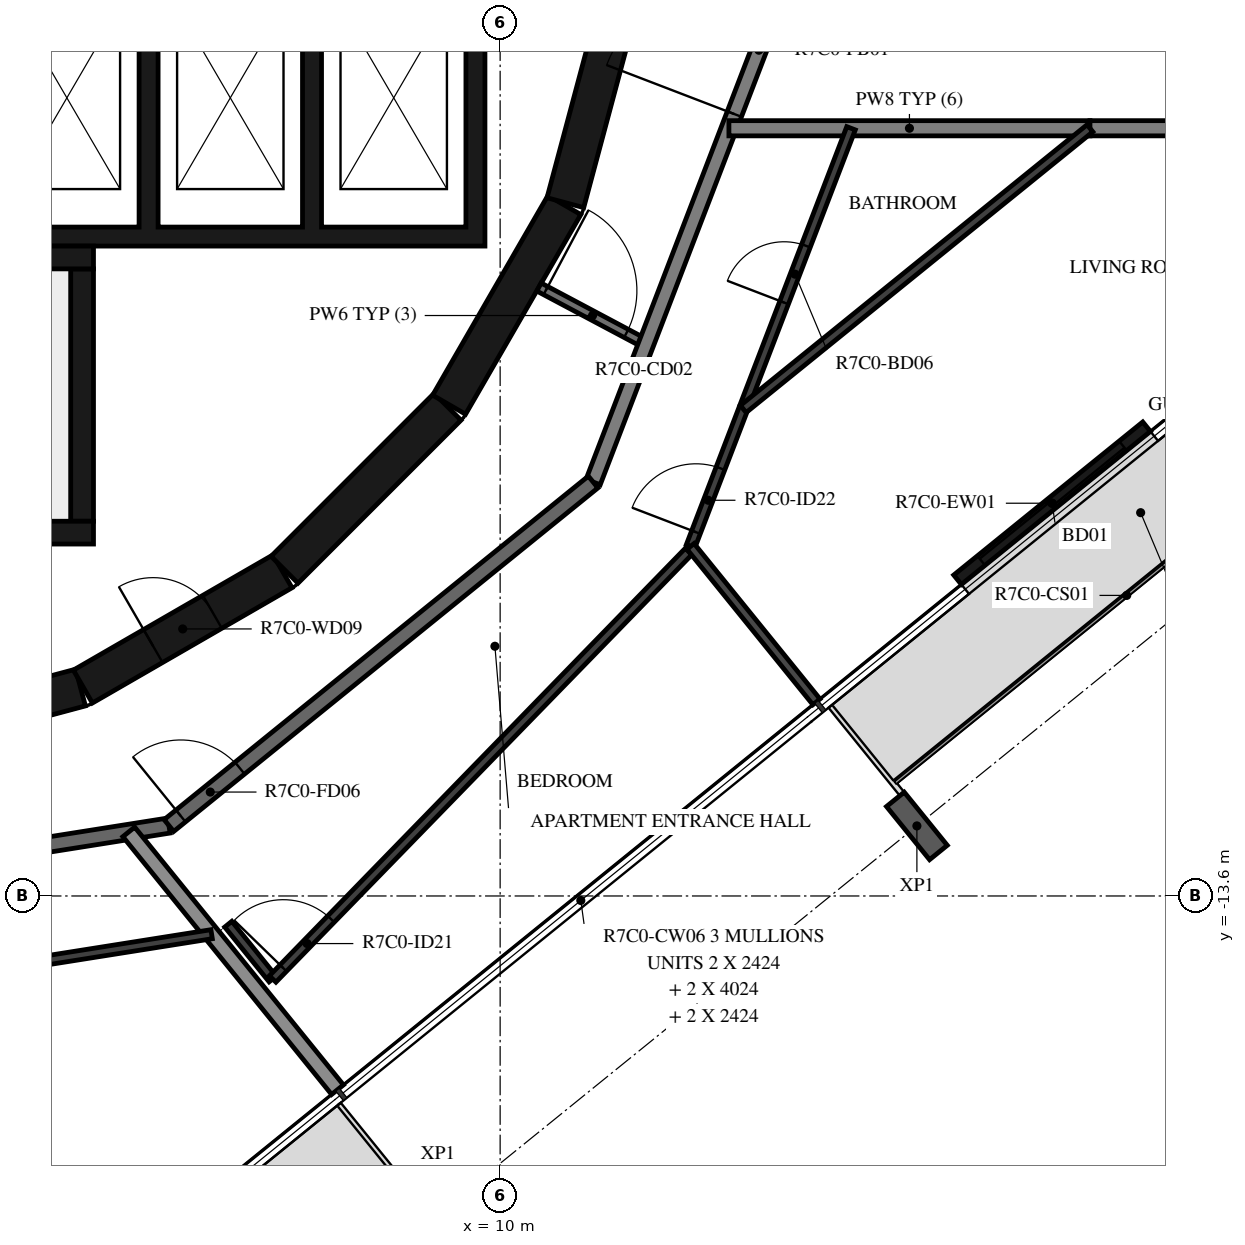
"""IFC4 building model, lengths in metres.
Left out: names, types, materials, properties, quantities, classifications, styles, units other than length and angle.
Written with IfcOpenShell. Run it as: python <this file> out.ifc"""

import sys

from ifc_helpers import new_model, si_unit, direction, frame, frame_2d, origin, origin_2d, place, context, subcontext, project, spatial, polyline, rectangle, i_section, outline, extrude, element, fill, save


model = new_model("IFC4")
c1 = context("Model", 3, precision=1e-05, world=origin(), true_north=direction((0.0, 1.0)))
c2 = subcontext(c1, "Body", "Model", "MODEL_VIEW")
j1 = project(units=[si_unit("LENGTHUNIT", "METRE"), si_unit("PLANEANGLEUNIT", "RADIAN")], contexts=[c1])
p1 = place(None, origin())
s1 = spatial("IfcSite", under=j1, at=p1, CompositionType="ELEMENT")
p2 = place(p1, origin())
s2 = spatial("IfcBuilding", under=s1, at=p2, CompositionType="ELEMENT")
p3 = place(p2, frame((0.0, 0.0, 284.4)))
s3 = spatial("IfcBuildingStorey", under=s2, at=p3, CompositionType="ELEMENT", Elevation=284.4)
p4 = place(p3, frame((15.483, -12.678, -0.38), z_axis=(0.0, 0.0, 1.0), x_axis=(-0.777146167973, -0.629320136024, 0.0)))
e1 = element("IfcColumn", 1, at=p4, inside=s3, PredefinedType="COLUMN", context=c2, shape_type="SweptSolid", body=[
    extrude(i_section(OverallWidth=0.3, OverallDepth=0.9, WebThickness=0.019, FlangeThickness=0.035, FilletRadius=0.03, at=origin_2d()), origin(), (0.0, 0.0, 1.0), 3.5),
])
p5 = place(p3, frame((16.018, -9.44, 0.0), z_axis=(0.0, 0.0, 1.0), x_axis=(0.777125818, 0.629345265333, 0.0)))
e2 = element("IfcWall", 2, at=p5, inside=s3, PredefinedType="STANDARD", context=c2, shape_type="SweptSolid", body=[
    extrude(rectangle(XDim=3.2, YDim=0.16, at=frame_2d((1.6, 0.0))), origin(), (0.0, 0.0, 1.0), 3.12),
])
p6 = place(p5, frame((0.4, 0.0, 0.0)))
e3 = element("IfcOpeningElement", 3, at=p6, cuts=e2, PredefinedType="OPENING", context=c2, shape_type="SweptSolid", body=[
    extrude(rectangle(XDim=2.4, YDim=2.4, at=frame_2d((1.2, 1.2))), frame((0.0, 0.09, 0.0), z_axis=(0.0, -1.0, 0.0), x_axis=(1.0, 0.0, 0.0)), (0.0, 0.0, 1.0), 0.18),
])
p7 = place(p3, frame((1.55, -11.643, 0.0), z_axis=(0.0, 0.0, 1.0), x_axis=(0.965948410781, 0.258734743916, 0.0)))
e4 = element("IfcWall", 4, at=p7, inside=s3, PredefinedType="SHEAR", context=c2, shape_type="SweptSolid", body=[
    extrude(rectangle(XDim=3.033, YDim=0.5, at=frame_2d((1.516, 0.0))), origin(), (0.0, 0.0, 1.0), 3.12),
])
p8 = place(p3, frame((4.51, -10.845, 0.0), z_axis=(0.0, 0.0, 1.0), x_axis=(0.865975092491, 0.500087131594, 0.0)))
e5 = element("IfcWall", 5, at=p8, inside=s3, PredefinedType="SHEAR", context=c2, shape_type="SweptSolid", body=[
    extrude(rectangle(XDim=3.033, YDim=0.5, at=frame_2d((1.516, 0.0))), origin(), (0.0, 0.0, 1.0), 3.12),
])
p9 = place(p8, frame((1.066, 0.0, 0.0)))
e6 = element("IfcOpeningElement", 6, at=p9, cuts=e5, PredefinedType="OPENING", context=c2, shape_type="SweptSolid", body=[
    extrude(rectangle(XDim=0.9, YDim=2.1, at=frame_2d((0.45, 1.05))), frame((0.0, 0.26, 0.0), z_axis=(0.0, -1.0, 0.0), x_axis=(1.0, 0.0, 0.0)), (0.0, 0.0, 1.0), 0.52),
])
p10 = place(p3, frame((7.164, -9.308, 0.0), z_axis=(0.0, 0.0, 1.0), x_axis=(0.707106781187, 0.707106781187, 0.0)))
e7 = element("IfcWall", 7, at=p10, inside=s3, PredefinedType="SHEAR", context=c2, shape_type="SweptSolid", body=[
    extrude(rectangle(XDim=3.032, YDim=0.5, at=frame_2d((1.516, 0.0))), origin(), (0.0, 0.0, 1.0), 3.12),
])
for number, where, z_axis, x_axis in (
    (8, (9.329, -7.137, 0.0), (0.0, 0.0, 1.0), (0.5, 0.866, 0.0)),
    (9, (10.858, -4.479, 0.0), (0.0, 0.0, 1.0), (0.259, 0.966, 0.0)),
):
    element("IfcWall", number, at=place(p3, frame(where, z_axis=z_axis, x_axis=x_axis)), inside=s3, PredefinedType="SHEAR", context=c2, shape_type="SweptSolid", body=[
        extrude(rectangle(XDim=3.033, YDim=0.5, at=frame_2d((1.516, 0.0))), origin(), (0.0, 0.0, 1.0), 3.12),
    ])
p11 = place(p3, frame((-2.4, -5.2, 0.0), z_axis=(0.0, 0.0, 1.0), x_axis=(1.0, 0.0, 0.0)))
e10 = element("IfcWall", 10, at=p11, inside=s3, PredefinedType="SHEAR", context=c2, shape_type="SweptSolid", body=[
    extrude(rectangle(XDim=7.05, YDim=0.3, at=frame_2d((3.525, 0.0))), origin(), (0.0, 0.0, 1.0), 3.12),
])
p12 = place(p3, frame((4.5, -8.67, 0.0), z_axis=(0.0, 0.0, 1.0), x_axis=(0.0, 1.0, 0.0)))
e11 = element("IfcWall", 11, at=p12, inside=s3, PredefinedType="SHEAR", context=c2, shape_type="SweptSolid", body=[
    extrude(rectangle(XDim=3.32, YDim=0.3, at=frame_2d((1.66, 0.0))), origin(), (0.0, 0.0, 1.0), 3.12),
])
p13 = place(p3, frame((0.1, -8.82, 0.0), z_axis=(0.0, 0.0, 1.0), x_axis=(1.0, 0.0, 0.0)))
e12 = element("IfcWall", 12, at=p13, inside=s3, PredefinedType="SHEAR", context=c2, shape_type="SweptSolid", body=[
    extrude(rectangle(XDim=4.55, YDim=0.3, at=frame_2d((2.275, 0.0))), origin(), (0.0, 0.0, 1.0), 3.12),
])
p14 = place(p3, origin())
e13 = element("IfcWall", 13, at=p14, inside=s3, PredefinedType="SHEAR", context=c2, shape_type="SweptSolid", body=[
    extrude(outline(polyline([(9.8, -5.05), (9.8, -4.8), (9.8, -1.9), (9.55, -1.9), (9.55, -4.8), (7.65, -4.8), (7.65, -1.9), (7.4, -1.9), (7.4, -4.8), (5.5, -4.8), (5.5, -1.9), (5.25, -1.9), (5.25, -4.8), (3.35, -4.8), (3.35, -1.9), (3.1, -1.9), (3.1, -4.8), (1.2, -4.8), (1.2, -1.9), (0.95, -1.9), (0.95, -4.8), (-0.95, -4.8), (-0.95, -1.9), (-1.2, -1.9), (-1.2, -4.8), (-3.1, -4.8), (-3.1, -1.9), (-3.35, -1.9), (-3.35, -4.8), (-5.25, -4.8), (-5.25, -1.9), (-5.5, -1.9), (-5.5, -4.8), (-9.55, -4.8), (-9.55, -1.9), (-9.8, -1.9), (-9.8, -4.8), (-9.8, -5.05), (9.8, -5.05)])), origin(), (0.0, 0.0, 1.0), 3.12),
])
p15 = place(p3, frame((10.511, -5.589, 0.0), z_axis=(0.0, 0.0, 1.0), x_axis=(0.882983002821, -0.469404960273, 0.0)))
e14 = element("IfcWall", 14, at=p15, inside=s3, PredefinedType="PARTITIONING", context=c2, shape_type="SweptSolid", body=[
    extrude(rectangle(XDim=1.596, YDim=0.12, at=frame_2d((0.798, 0.0))), origin(), (0.0, 0.0, 1.0), 3.12),
])
p16 = place(p15, frame((0.1, 0.0, 0.0)))
e15 = element("IfcOpeningElement", 15, at=p16, cuts=e14, PredefinedType="OPENING", context=c2, shape_type="SweptSolid", body=[
    extrude(rectangle(XDim=1.2, YDim=2.1, at=frame_2d((0.6, 1.05))), frame((0.0, 0.07, 0.0), z_axis=(0.0, -1.0, 0.0), x_axis=(1.0, 0.0, 0.0)), (0.0, 0.0, 1.0), 0.14),
])
p17 = place(p3, frame((11.223, -8.154, 0.0), z_axis=(0.0, 0.0, 1.0), x_axis=(0.358341090983, 0.93359073609, 0.0)))
e16 = element("IfcWall", 16, at=p17, inside=s3, PredefinedType="STANDARD", context=c2, shape_type="SweptSolid", body=[
    extrude(rectangle(XDim=7.181, YDim=0.2, at=frame_2d((3.59, 0.0))), origin(), (0.0, 0.0, 1.0), 3.12),
])
p18 = place(p17, frame((5.185, 0.0, 0.0)))
e17 = element("IfcOpeningElement", 17, at=p18, cuts=e16, PredefinedType="OPENING", context=c2, shape_type="SweptSolid", body=[
    extrude(rectangle(XDim=1.8, YDim=2.1, at=frame_2d((0.9, 1.05))), frame((0.0, 0.11, 0.0), z_axis=(0.0, -1.0, 0.0), x_axis=(1.0, 0.0, 0.0)), (0.0, 0.0, 1.0), 0.22),
])
p19 = place(p3, frame((-1.45, -13.797, 0.0), z_axis=(0.0, 0.0, 1.0), x_axis=(0.987690361611, 0.156421704315, 0.0)))
e18 = element("IfcWall", 18, at=p19, inside=s3, PredefinedType="STANDARD", context=c2, shape_type="SweptSolid", body=[
    extrude(rectangle(XDim=7.181, YDim=0.2, at=frame_2d((3.591, 0.0))), origin(), (0.0, 0.0, 1.0), 3.12),
])
p20 = place(p19, frame((0.2, 0.0, 0.0)))
e19 = element("IfcOpeningElement", 19, at=p20, cuts=e18, PredefinedType="OPENING", context=c2, shape_type="SweptSolid", body=[
    extrude(rectangle(XDim=1.0, YDim=2.1, at=frame_2d((0.5, 1.05))), frame((0.0, 0.11, 0.0), z_axis=(0.0, -1.0, 0.0), x_axis=(1.0, 0.0, 0.0)), (0.0, 0.0, 1.0), 0.22),
])
p21 = place(p3, frame((5.643, -12.673, 0.0), z_axis=(0.0, 0.0, 1.0), x_axis=(0.777160148113, 0.629302871585, 0.0)))
e20 = element("IfcWall", 20, at=p21, inside=s3, PredefinedType="STANDARD", context=c2, shape_type="SweptSolid", body=[
    extrude(rectangle(XDim=7.181, YDim=0.2, at=frame_2d((3.59, 0.0))), origin(), (0.0, 0.0, 1.0), 3.12),
])
p22 = place(p21, frame((0.2, 0.0, 0.0)))
e21 = element("IfcOpeningElement", 21, at=p22, cuts=e20, PredefinedType="OPENING", context=c2, shape_type="SweptSolid", body=[
    extrude(rectangle(XDim=1.0, YDim=2.1, at=frame_2d((0.5, 1.05))), frame((0.0, 0.11, 0.0), z_axis=(0.0, -1.0, 0.0), x_axis=(1.0, 0.0, 0.0)), (0.0, 0.0, 1.0), 0.22),
])
p23 = place(p3, frame((13.01, -3.5, 0.0), z_axis=(0.0, 0.0, 1.0), x_axis=(1.0, 0.0, 0.0)))
e22 = element("IfcWall", 22, at=p23, inside=s3, PredefinedType="STANDARD", context=c2, shape_type="SweptSolid", body=[
    extrude(rectangle(XDim=4.75, YDim=0.2, at=frame_2d((2.375, 0.0))), origin(), (0.0, 0.0, 1.0), 3.12),
])
p24 = place(p3, frame((17.76, -3.5, 0.0), z_axis=(0.0, 0.0, 1.0), x_axis=(1.0, 0.0, 0.0)))
e23 = element("IfcWall", 23, at=p24, inside=s3, PredefinedType="STANDARD", context=c2, shape_type="SweptSolid", body=[
    extrude(rectangle(XDim=1.64, YDim=0.2, at=frame_2d((0.82, 0.0))), origin(), (0.0, 0.0, 1.0), 3.12),
])
p25 = place(p3, frame((7.861, -16.148, 0.0), z_axis=(0.0, 0.0, 1.0), x_axis=(-0.629330189513, 0.777138026716, 0.0)))
e24 = element("IfcWall", 24, at=p25, inside=s3, PredefinedType="STANDARD", context=c2, shape_type="SweptSolid", body=[
    extrude(rectangle(XDim=4.364, YDim=0.2, at=frame_2d((2.182, 0.0))), origin(), (0.0, 0.0, 1.0), 2.73),
])
p26 = place(p3, frame((-1.612, -15.341, 0.0), z_axis=(0.0, 0.0, 1.0), x_axis=(0.987687560018, 0.15643939333, 0.0)))
e25 = element("IfcWall", 25, at=p26, inside=s3, PredefinedType="PARTITIONING", context=c2, shape_type="SweptSolid", body=[
    extrude(rectangle(XDim=7.914, YDim=0.12, at=frame_2d((3.957, 0.0))), origin(), (0.0, 0.0, 1.0), 3.12),
])
p27 = place(p26, frame((2.978, 0.0, 0.0)))
e26 = element("IfcOpeningElement", 26, at=p27, cuts=e25, PredefinedType="OPENING", context=c2, shape_type="SweptSolid", body=[
    extrude(rectangle(XDim=0.9, YDim=2.1, at=frame_2d((0.45, 1.05))), frame((0.0, 0.07, 0.0), z_axis=(0.0, -1.0, 0.0), x_axis=(1.0, 0.0, 0.0)), (0.0, 0.0, 1.0), 0.14),
])
p28 = place(p3, frame((6.424, -13.971, 0.0), z_axis=(0.0, 0.0, 1.0), x_axis=(0.629273936268, -0.777183577499, 0.0)))
e27 = element("IfcWall", 27, at=p28, inside=s3, PredefinedType="PARTITIONING", context=c2, shape_type="SweptSolid", body=[
    extrude(rectangle(XDim=0.928, YDim=0.12, at=frame_2d((0.464, 0.0))), origin(), (0.0, 0.0, 1.0), 3.12),
])
p29 = place(p3, frame((7.007, -14.692, 0.0), z_axis=(0.0, 0.0, 1.0), x_axis=(0.697286714348, 0.716792325568, 0.0)))
e28 = element("IfcWall", 28, at=p29, inside=s3, PredefinedType="PARTITIONING", context=c2, shape_type="SweptSolid", body=[
    extrude(rectangle(XDim=7.848, YDim=0.12, at=frame_2d((3.924, 0.0))), origin(), (0.0, 0.0, 1.0), 3.12),
])
p30 = place(p29, frame((0.2, 0.0, 0.0)))
e29 = element("IfcOpeningElement", 29, at=p30, cuts=e28, PredefinedType="OPENING", context=c2, shape_type="SweptSolid", body=[
    extrude(rectangle(XDim=0.9, YDim=2.1, at=frame_2d((0.45, 1.05))), frame((0.0, 0.07, 0.0), z_axis=(0.0, -1.0, 0.0), x_axis=(1.0, 0.0, 0.0)), (0.0, 0.0, 1.0), 0.14),
])
p31 = place(p3, frame((12.505, -9.001, 0.0), z_axis=(0.0, 0.0, 1.0), x_axis=(0.358373707046, 0.933578216379, 0.0)))
e30 = element("IfcWall", 30, at=p31, inside=s3, PredefinedType="PARTITIONING", context=c2, shape_type="SweptSolid", body=[
    extrude(rectangle(XDim=5.892, YDim=0.12, at=frame_2d((2.946, 0.0))), origin(), (0.0, 0.0, 1.0), 3.12),
])
p32 = place(p31, frame((0.2, 0.0, 0.0)))
e31 = element("IfcOpeningElement", 31, at=p32, cuts=e30, PredefinedType="OPENING", context=c2, shape_type="SweptSolid", body=[
    extrude(rectangle(XDim=0.9, YDim=2.1, at=frame_2d((0.45, 1.05))), frame((0.0, 0.07, 0.0), z_axis=(0.0, -1.0, 0.0), x_axis=(1.0, 0.0, 0.0)), (0.0, 0.0, 1.0), 0.14),
])
p33 = place(p31, frame((3.436, 0.0, 0.0)))
e32 = element("IfcOpeningElement", 32, at=p33, cuts=e30, PredefinedType="OPENING", context=c2, shape_type="SweptSolid", body=[
    extrude(rectangle(XDim=0.8, YDim=2.1, at=frame_2d((0.4, 1.05))), frame((0.0, 0.07, 0.0), z_axis=(0.0, -1.0, 0.0), x_axis=(1.0, 0.0, 0.0)), (0.0, 0.0, 1.0), 0.14),
])
p34 = place(p3, frame((14.161, -11.046, 0.0), z_axis=(0.0, 0.0, 1.0), x_axis=(-0.62931028473, 0.777154145284, 0.0)))
e33 = element("IfcWall", 33, at=p34, inside=s3, PredefinedType="PARTITIONING", context=c2, shape_type="SweptSolid", body=[
    extrude(rectangle(XDim=2.632, YDim=0.12, at=frame_2d((1.316, 0.0))), origin(), (0.0, 0.0, 1.0), 2.73),
])
p35 = place(p3, frame((17.76, -3.5, 0.0), z_axis=(0.0, 0.0, 1.0), x_axis=(-0.777133455716, -0.62933583404, 0.0)))
e34 = element("IfcWall", 34, at=p35, inside=s3, PredefinedType="PARTITIONING", context=c2, shape_type="SweptSolid", body=[
    extrude(rectangle(XDim=5.869, YDim=0.12, at=frame_2d((2.935, 0.0))), origin(), (0.0, 0.0, 1.0), 3.12),
])
p36 = place(p6, origin())
e35 = element("IfcDoor", 35, at=p36, inside=s3, OperationType="DOUBLE_DOOR_SLIDING", PredefinedType="DOOR", context=c2, shape_type="SweptSolid", body=[
    extrude(rectangle(XDim=2.4, YDim=2.4, at=frame_2d((1.2, 1.2))), frame((0.0, 0.025, 0.0), z_axis=(0.0, -1.0, 0.0), x_axis=(1.0, 0.0, 0.0)), (0.0, 0.0, 1.0), 0.05),
])
fill(e3, e35)
p37 = place(p9, origin())
e36 = element("IfcDoor", 36, at=p37, inside=s3, OperationType="SINGLE_SWING_LEFT", PredefinedType="DOOR", context=c2, shape_type="SweptSolid", body=[
    extrude(rectangle(XDim=0.9, YDim=2.1, at=frame_2d((0.45, 1.05))), frame((0.0, 0.025, 0.0), z_axis=(0.0, -1.0, 0.0), x_axis=(1.0, 0.0, 0.0)), (0.0, 0.0, 1.0), 0.05),
])
fill(e6, e36)
p38 = place(p22, origin())
e37 = element("IfcDoor", 37, at=p38, inside=s3, OperationType="SINGLE_SWING_LEFT", PredefinedType="DOOR", context=c2, shape_type="SweptSolid", body=[
    extrude(rectangle(XDim=1.0, YDim=2.1, at=frame_2d((0.5, 1.05))), frame((0.0, 0.025, 0.0), z_axis=(0.0, -1.0, 0.0), x_axis=(1.0, 0.0, 0.0)), (0.0, 0.0, 1.0), 0.05),
])
fill(e21, e37)
p39 = place(p30, origin())
e38 = element("IfcDoor", 38, at=p39, inside=s3, OperationType="SINGLE_SWING_LEFT", PredefinedType="DOOR", context=c2, shape_type="SweptSolid", body=[
    extrude(rectangle(XDim=0.9, YDim=2.1, at=frame_2d((0.45, 1.05))), frame((0.0, 0.025, 0.0), z_axis=(0.0, -1.0, 0.0), x_axis=(1.0, 0.0, 0.0)), (0.0, 0.0, 1.0), 0.05),
])
fill(e29, e38)
p40 = place(p32, origin())
e39 = element("IfcDoor", 39, at=p40, inside=s3, OperationType="SINGLE_SWING_RIGHT", PredefinedType="DOOR", context=c2, shape_type="SweptSolid", body=[
    extrude(rectangle(XDim=0.9, YDim=2.1, at=frame_2d((0.45, 1.05))), frame((0.0, 0.025, 0.0), z_axis=(0.0, -1.0, 0.0), x_axis=(1.0, 0.0, 0.0)), (0.0, 0.0, 1.0), 0.05),
])
fill(e31, e39)
p41 = place(p33, origin())
e40 = element("IfcDoor", 40, at=p41, inside=s3, OperationType="SINGLE_SWING_RIGHT", PredefinedType="DOOR", context=c2, shape_type="SweptSolid", body=[
    extrude(rectangle(XDim=0.8, YDim=2.1, at=frame_2d((0.4, 1.05))), frame((0.0, 0.025, 0.0), z_axis=(0.0, -1.0, 0.0), x_axis=(1.0, 0.0, 0.0)), (0.0, 0.0, 1.0), 0.05),
])
fill(e32, e40)
p42 = place(p16, origin())
e41 = element("IfcDoor", 41, at=p42, inside=s3, OperationType="DOUBLE_DOOR_SINGLE_SWING", PredefinedType="DOOR", context=c2, shape_type="SweptSolid", body=[
    extrude(rectangle(XDim=1.2, YDim=2.1, at=frame_2d((0.6, 1.05))), frame((0.0, 0.025, 0.0), z_axis=(0.0, -1.0, 0.0), x_axis=(1.0, 0.0, 0.0)), (0.0, 0.0, 1.0), 0.05),
])
fill(e15, e41)
p43 = place(p18, origin())
e42 = element("IfcDoor", 42, at=p43, inside=s3, OperationType="DOUBLE_DOOR_SINGLE_SWING", PredefinedType="DOOR", context=c2, shape_type="SweptSolid", body=[
    extrude(rectangle(XDim=1.8, YDim=2.1, at=frame_2d((0.9, 1.05))), frame((0.0, 0.025, 0.0), z_axis=(0.0, -1.0, 0.0), x_axis=(1.0, 0.0, 0.0)), (0.0, 0.0, 1.0), 0.05),
])
fill(e17, e42)
save(model, sys.argv[1])
